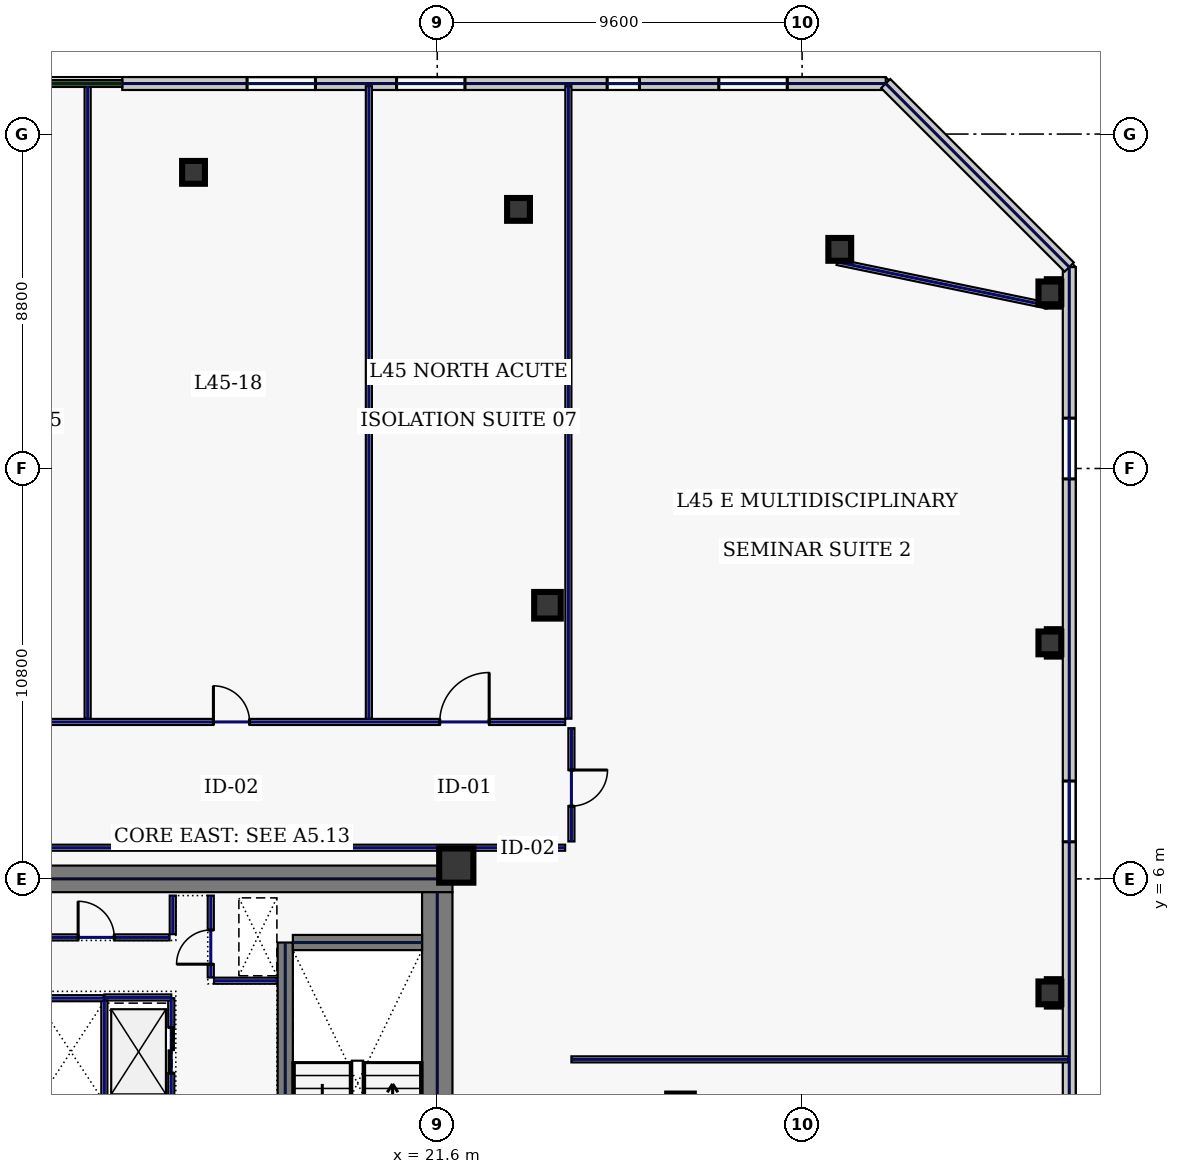
"""IFC4 building model, lengths in metres.
Left out: names, types, materials, properties, quantities, classifications, styles, units other than length and angle.
Written with IfcOpenShell. Run it as: python <this file> out.ifc"""

import sys

from ifc_helpers import new_model, si_unit, direction, frame, frame_2d, origin, origin_2d, place, context, subcontext, project, spatial, rectangle, hollow_rectangle, extrude, element, fill, save


model = new_model("IFC4")
c1 = context("Model", 3, precision=1e-05, world=origin(), true_north=direction((0.0, 1.0)))
c2 = subcontext(c1, "Body", "Model", "MODEL_VIEW")
j1 = project(units=[si_unit("LENGTHUNIT", "METRE"), si_unit("PLANEANGLEUNIT", "RADIAN")], contexts=[c1])
p1 = place(None, origin())
s1 = spatial("IfcSite", under=j1, at=p1, CompositionType="ELEMENT")
p2 = place(p1, origin())
s2 = spatial("IfcBuilding", under=s1, at=p2, CompositionType="ELEMENT")
p3 = place(p2, frame((0.0, 0.0, 196.2)))
s3 = spatial("IfcBuildingStorey", under=s2, at=p3, CompositionType="ELEMENT", Elevation=196.2)
p4 = place(p3, frame((10.45, 6.0, 0.0), z_axis=(0.0, 0.0, 1.0), x_axis=(1.0, 0.0, 0.0)))
e1 = element("IfcWall", 1, at=p4, inside=s3, PredefinedType="SHEAR", context=c2, shape_type="SweptSolid", body=[
    extrude(rectangle(XDim=11.55, YDim=0.7, at=frame_2d((5.775, 0.0))), origin(), (0.0, 0.0, 1.0), 3.74),
])
p5 = place(p3, frame((21.6, -5.65, 0.0), z_axis=(0.0, 0.0, 1.0), x_axis=(0.0, 1.0, 0.0)))
e2 = element("IfcWall", 2, at=p5, inside=s3, PredefinedType="SHEAR", context=c2, shape_type="SweptSolid", body=[
    extrude(rectangle(XDim=11.3, YDim=0.8, at=frame_2d((5.65, 0.0))), origin(), (0.0, 0.0, 1.0), 3.74),
])
p6 = place(p3, frame((17.6, -4.325, 0.0), z_axis=(0.0, 0.0, 1.0), x_axis=(0.0, 1.0, 0.0)))
e3 = element("IfcWall", 3, at=p6, inside=s3, PredefinedType="SHEAR", context=c2, shape_type="SweptSolid", body=[
    extrude(rectangle(XDim=8.65, YDim=0.4, at=frame_2d((4.325, 0.0))), origin(), (0.0, 0.0, 1.0), 3.74),
])
p7 = place(p6, frame((0.25, 0.0, 0.0)))
e4 = element("IfcOpeningElement", 4, at=p7, cuts=e3, PredefinedType="OPENING", context=c2, shape_type="SweptSolid", body=[
    extrude(rectangle(XDim=1.1, YDim=2.2, at=frame_2d((0.55, 1.1))), frame((0.0, 0.21, 0.0), z_axis=(0.0, -1.0, 0.0), x_axis=(1.0, 0.0, 0.0)), (0.0, 0.0, 1.0), 0.42),
])
p8 = place(p3, frame((17.8, 4.325, 0.0), z_axis=(0.0, 0.0, 1.0), x_axis=(1.0, 0.0, 0.0)))
e5 = element("IfcWall", 5, at=p8, inside=s3, PredefinedType="SHEAR", context=c2, shape_type="SweptSolid", body=[
    extrude(rectangle(XDim=3.4, YDim=0.4, at=frame_2d((1.7, 0.0))), origin(), (0.0, 0.0, 1.0), 3.74),
])
p9 = place(p3, frame((22.1, 6.35, 0.0), z_axis=(0.0, 0.0, 1.0), x_axis=(1.0, 0.0, 0.0)))
e6 = element("IfcColumn", 6, at=p9, inside=s3, PredefinedType="COLUMN", context=c2, shape_type="SweptSolid", body=[
    extrude(hollow_rectangle(XDim=0.9, YDim=0.9, WallThickness=0.04, at=origin_2d()), origin(), (0.0, 0.0, 1.0), 3.74),
])
for number, where, z_axis, x_axis in (
    (7, (24.5, 13.2, 0.0), (0.0, 0.0, 1.0), (1.0, 0.0, 0.0)),
    (8, (28.0, 0.0, 0.0), (0.0, 0.0, 1.0), (1.0, 0.0, 0.0)),
):
    element("IfcColumn", number, at=place(p3, frame(where, z_axis=z_axis, x_axis=x_axis)), inside=s3, PredefinedType="COLUMN", context=c2, shape_type="SweptSolid", body=[
        extrude(hollow_rectangle(XDim=0.7, YDim=0.7, WallThickness=0.032, at=origin_2d()), origin(), (0.0, 0.0, 1.0), 3.74),
    ])
for number, where, z_axis, x_axis in (
    (9, (32.191, 22.566, 0.0), (0.0, 0.0, 1.0), (1.0, 0.0, 0.0)),
    (10, (23.738, 23.618, 0.0), (0.0, 0.0, 1.0), (1.0, 0.0, 0.0)),
    (11, (15.186, 24.592, 0.0), (0.0, 0.0, 1.0), (1.0, 0.0, 0.0)),
    (12, (37.72, 3.0, 0.0), (0.0, 0.0, 1.0), (1.0, 0.0, 0.0)),
    (13, (37.72, 12.21, 0.0), (0.0, 0.0, 1.0), (1.0, 0.0, 0.0)),
    (14, (37.72, 21.42, 0.0), (0.0, 0.0, 1.0), (1.0, 0.0, 0.0)),
):
    element("IfcColumn", number, at=place(p3, frame(where, z_axis=z_axis, x_axis=x_axis)), inside=s3, PredefinedType="COLUMN", context=c2, shape_type="SweptSolid", body=[
        extrude(hollow_rectangle(XDim=0.6, YDim=0.6, WallThickness=0.028, at=origin_2d()), origin(), (0.0, 0.0, 1.0), 3.74),
    ])
p10 = place(p3, frame((33.4, 26.93, 0.0), z_axis=(0.0, 0.0, 1.0), x_axis=(-1.0, 0.0, 0.0)))
e15 = element("IfcWall", 15, at=p10, inside=s3, PredefinedType="STANDARD", context=c2, shape_type="SweptSolid", body=[
    extrude(rectangle(XDim=20.09, YDim=0.34, at=frame_2d((10.045, 0.0))), origin(), (0.0, 0.0, 1.0), 3.74),
])
p11 = place(p10, frame((15.005, 0.0, 0.7)))
e16 = element("IfcOpeningElement", 16, at=p11, cuts=e15, PredefinedType="OPENING", context=c2, shape_type="SweptSolid", body=[
    extrude(rectangle(XDim=1.8, YDim=2.2, at=frame_2d((0.9, 1.1))), frame((0.0, 0.18, 0.0), z_axis=(0.0, -1.0, 0.0), x_axis=(1.0, 0.0, 0.0)), (0.0, 0.0, 1.0), 0.36),
])
p12 = place(p10, frame((11.071, 0.0, 0.7)))
e17 = element("IfcOpeningElement", 17, at=p12, cuts=e15, PredefinedType="OPENING", context=c2, shape_type="SweptSolid", body=[
    extrude(rectangle(XDim=1.8, YDim=2.2, at=frame_2d((0.9, 1.1))), frame((0.0, 0.18, 0.0), z_axis=(0.0, -1.0, 0.0), x_axis=(1.0, 0.0, 0.0)), (0.0, 0.0, 1.0), 0.36),
])
p13 = place(p10, frame((6.48, 0.0, 0.7)))
e18 = element("IfcOpeningElement", 18, at=p13, cuts=e15, PredefinedType="OPENING", context=c2, shape_type="SweptSolid", body=[
    extrude(rectangle(XDim=0.85, YDim=1.85, at=frame_2d((0.425, 0.925))), frame((0.0, 0.18, 0.0), z_axis=(0.0, -1.0, 0.0), x_axis=(1.0, 0.0, 0.0)), (0.0, 0.0, 1.0), 0.36),
])
p14 = place(p10, frame((2.591, 0.0, 0.7)))
e19 = element("IfcOpeningElement", 19, at=p14, cuts=e15, PredefinedType="OPENING", context=c2, shape_type="SweptSolid", body=[
    extrude(rectangle(XDim=1.8, YDim=2.2, at=frame_2d((0.9, 1.1))), frame((0.0, 0.18, 0.0), z_axis=(0.0, -1.0, 0.0), x_axis=(1.0, 0.0, 0.0)), (0.0, 0.0, 1.0), 0.36),
])
p15 = place(p3, frame((38.23, -16.1, 0.0), z_axis=(0.0, 0.0, 1.0), x_axis=(0.0, 1.0, 0.0)))
e20 = element("IfcWall", 20, at=p15, inside=s3, PredefinedType="STANDARD", context=c2, shape_type="SweptSolid", body=[
    extrude(rectangle(XDim=38.2, YDim=0.34, at=frame_2d((19.1, 0.0))), origin(), (0.0, 0.0, 1.0), 3.74),
])
p16 = place(p15, frame((3.975, 0.0, 0.58)))
e21 = element("IfcOpeningElement", 21, at=p16, cuts=e20, PredefinedType="OPENING", context=c2, shape_type="SweptSolid", body=[
    extrude(rectangle(XDim=1.6, YDim=2.3, at=frame_2d((0.8, 1.15))), frame((0.0, 0.18, 0.0), z_axis=(0.0, -1.0, 0.0), x_axis=(1.0, 0.0, 0.0)), (0.0, 0.0, 1.0), 0.36),
])
p17 = place(p15, frame((13.525, 0.0, 0.58)))
e22 = element("IfcOpeningElement", 22, at=p17, cuts=e20, PredefinedType="OPENING", context=c2, shape_type="SweptSolid", body=[
    extrude(rectangle(XDim=1.6, YDim=2.3, at=frame_2d((0.8, 1.15))), frame((0.0, 0.18, 0.0), z_axis=(0.0, -1.0, 0.0), x_axis=(1.0, 0.0, 0.0)), (0.0, 0.0, 1.0), 0.36),
])
p18 = place(p15, frame((23.075, 0.0, 0.58)))
e23 = element("IfcOpeningElement", 23, at=p18, cuts=e20, PredefinedType="OPENING", context=c2, shape_type="SweptSolid", body=[
    extrude(rectangle(XDim=1.6, YDim=2.3, at=frame_2d((0.8, 1.15))), frame((0.0, 0.18, 0.0), z_axis=(0.0, -1.0, 0.0), x_axis=(1.0, 0.0, 0.0)), (0.0, 0.0, 1.0), 0.36),
])
p19 = place(p15, frame((32.625, 0.0, 0.58)))
e24 = element("IfcOpeningElement", 24, at=p19, cuts=e20, PredefinedType="OPENING", context=c2, shape_type="SweptSolid", body=[
    extrude(rectangle(XDim=1.6, YDim=2.3, at=frame_2d((0.8, 1.15))), frame((0.0, 0.18, 0.0), z_axis=(0.0, -1.0, 0.0), x_axis=(1.0, 0.0, 0.0)), (0.0, 0.0, 1.0), 0.36),
])
p20 = place(p3, frame((38.23, 22.1, 0.0), z_axis=(0.0, 0.0, 1.0), x_axis=(-0.707124652085, 0.707088909836, 0.0)))
e25 = element("IfcWall", 25, at=p20, inside=s3, PredefinedType="STANDARD", context=c2, shape_type="SweptSolid", body=[
    extrude(rectangle(XDim=6.831, YDim=0.34, at=frame_2d((3.415, 0.0))), origin(), (0.0, 0.0, 1.0), 3.74),
])
p21 = place(p3, frame((14.6, 0.12, 0.0), z_axis=(0.0, 0.0, 1.0), x_axis=(0.0, 1.0, 0.0)))
e26 = element("IfcWall", 26, at=p21, inside=s3, PredefinedType="PARTITIONING", context=c2, shape_type="SweptSolid", body=[
    extrude(rectangle(XDim=2.74, YDim=0.16, at=frame_2d((1.37, 0.0))), origin(), (0.0, 0.0, 1.0), 3.74),
])
p22 = place(p21, frame((0.77, 0.0, 0.0)))
e27 = element("IfcOpeningElement", 27, at=p22, cuts=e26, PredefinedType="OPENING", context=c2, shape_type="SweptSolid", body=[
    extrude(rectangle(XDim=1.2, YDim=2.2, at=frame_2d((0.6, 1.1))), frame((0.0, 0.09, 0.0), z_axis=(0.0, -1.0, 0.0), x_axis=(1.0, 0.0, 0.0)), (0.0, 0.0, 1.0), 0.18),
])
p23 = place(p3, frame((12.84, 2.88, 0.0), z_axis=(0.0, 0.0, 1.0), x_axis=(1.0, 0.0, 0.0)))
e28 = element("IfcWall", 28, at=p23, inside=s3, PredefinedType="PARTITIONING", context=c2, shape_type="SweptSolid", body=[
    extrude(rectangle(XDim=1.76, YDim=0.16, at=frame_2d((0.88, 0.0))), origin(), (0.0, 0.0, 1.0), 3.74),
])
p24 = place(p3, frame((12.84, 0.18, 0.0), z_axis=(0.0, 0.0, 1.0), x_axis=(0.0, 1.0, 0.0)))
e29 = element("IfcWall", 29, at=p24, inside=s3, PredefinedType="PARTITIONING", context=c2, shape_type="SweptSolid", body=[
    extrude(rectangle(XDim=2.62, YDim=0.16, at=frame_2d((1.31, 0.0))), origin(), (0.0, 0.0, 1.0), 3.74),
])
p25 = place(p3, frame((11.1, 2.86, 0.0), z_axis=(0.0, 0.0, 1.0), x_axis=(1.0, 0.0, 0.0)))
e30 = element("IfcWall", 30, at=p25, inside=s3, PredefinedType="PARTITIONING", context=c2, shape_type="SweptSolid", body=[
    extrude(rectangle(XDim=1.72, YDim=0.16, at=frame_2d((0.86, 0.0))), origin(), (0.0, 0.0, 1.0), 3.74),
])
p26 = place(p3, frame((15.64, 3.405, 0.0), z_axis=(0.0, 0.0, 1.0), x_axis=(0.0, 1.0, 0.0)))
e31 = element("IfcWall", 31, at=p26, inside=s3, PredefinedType="PARTITIONING", context=c2, shape_type="SweptSolid", body=[
    extrude(rectangle(XDim=2.155, YDim=0.16, at=frame_2d((1.078, 0.0))), origin(), (0.0, 0.0, 1.0), 3.74),
])
p27 = place(p26, frame((0.35, 0.0, 0.0)))
e32 = element("IfcOpeningElement", 32, at=p27, cuts=e31, PredefinedType="OPENING", context=c2, shape_type="SweptSolid", body=[
    extrude(rectangle(XDim=0.9, YDim=2.2, at=frame_2d((0.45, 1.1))), frame((0.0, 0.09, 0.0), z_axis=(0.0, -1.0, 0.0), x_axis=(1.0, 0.0, 0.0)), (0.0, 0.0, 1.0), 0.18),
])
p28 = place(p3, frame((15.725, 3.32, 0.0), z_axis=(0.0, 0.0, 1.0), x_axis=(1.0, 0.0, 0.0)))
e33 = element("IfcWall", 33, at=p28, inside=s3, PredefinedType="PARTITIONING", context=c2, shape_type="SweptSolid", body=[
    extrude(rectangle(XDim=1.655, YDim=0.16, at=frame_2d((0.827, 0.0))), origin(), (0.0, 0.0, 1.0), 3.74),
])
p29 = place(p3, frame((10.8, 4.46, 0.0), z_axis=(0.0, 0.0, 1.0), x_axis=(1.0, 0.0, 0.0)))
e34 = element("IfcWall", 34, at=p29, inside=s3, PredefinedType="PARTITIONING", context=c2, shape_type="SweptSolid", body=[
    extrude(rectangle(XDim=3.755, YDim=0.16, at=frame_2d((1.877, 0.0))), origin(), (0.0, 0.0, 1.0), 3.74),
])
p30 = place(p29, frame((1.35, 0.0, 0.0)))
e35 = element("IfcOpeningElement", 35, at=p30, cuts=e34, PredefinedType="OPENING", context=c2, shape_type="SweptSolid", body=[
    extrude(rectangle(XDim=0.95, YDim=2.2, at=frame_2d((0.475, 1.1))), frame((0.0, 0.09, 0.0), z_axis=(0.0, -1.0, 0.0), x_axis=(1.0, 0.0, 0.0)), (0.0, 0.0, 1.0), 0.18),
])
p31 = place(p3, frame((14.64, 4.545, 0.0), z_axis=(0.0, 0.0, 1.0), x_axis=(0.0, 1.0, 0.0)))
e36 = element("IfcWall", 36, at=p31, inside=s3, PredefinedType="PARTITIONING", context=c2, shape_type="SweptSolid", body=[
    extrude(rectangle(XDim=1.015, YDim=0.16, at=frame_2d((0.508, 0.0))), origin(), (0.0, 0.0, 1.0), 3.74),
])
p32 = place(p3, frame((37.651, 21.087, 0.0), z_axis=(0.0, 0.0, 1.0), x_axis=(-0.979184618318, 0.202971631636, 0.0)))
e37 = element("IfcWall", 37, at=p32, inside=s3, PredefinedType="PARTITIONING", context=c2, shape_type="SweptSolid", body=[
    extrude(rectangle(XDim=5.646, YDim=0.16, at=frame_2d((2.823, 0.0))), origin(), (0.0, 0.0, 1.0), 3.74),
])
p33 = place(p3, frame((-24.965, 10.13, 0.0), z_axis=(0.0, 0.0, 1.0), x_axis=(1.0, 0.0, 0.0)))
e38 = element("IfcWall", 38, at=p33, inside=s3, PredefinedType="PARTITIONING", context=c2, shape_type="SweptSolid", body=[
    extrude(rectangle(XDim=49.93, YDim=0.16, at=frame_2d((24.965, 0.0))), origin(), (0.0, 0.0, 1.0), 3.74),
])
p34 = place(p33, frame((2.044, 0.0, 0.0)))
e39 = element("IfcOpeningElement", 39, at=p34, cuts=e38, PredefinedType="OPENING", context=c2, shape_type="SweptSolid", body=[
    extrude(rectangle(XDim=0.95, YDim=2.2, at=frame_2d((0.475, 1.1))), frame((0.0, 0.09, 0.0), z_axis=(0.0, -1.0, 0.0), x_axis=(1.0, 0.0, 0.0)), (0.0, 0.0, 1.0), 0.18),
])
p35 = place(p33, frame((7.775, 0.0, 0.0)))
e40 = element("IfcOpeningElement", 40, at=p35, cuts=e38, PredefinedType="OPENING", context=c2, shape_type="SweptSolid", body=[
    extrude(rectangle(XDim=0.95, YDim=2.2, at=frame_2d((0.475, 1.1))), frame((0.0, 0.09, 0.0), z_axis=(0.0, -1.0, 0.0), x_axis=(1.0, 0.0, 0.0)), (0.0, 0.0, 1.0), 0.18),
])
p36 = place(p33, frame((15.275, 0.0, 0.0)))
e41 = element("IfcOpeningElement", 41, at=p36, cuts=e38, PredefinedType="OPENING", context=c2, shape_type="SweptSolid", body=[
    extrude(rectangle(XDim=0.95, YDim=2.2, at=frame_2d((0.475, 1.1))), frame((0.0, 0.09, 0.0), z_axis=(0.0, -1.0, 0.0), x_axis=(1.0, 0.0, 0.0)), (0.0, 0.0, 1.0), 0.18),
])
p37 = place(p33, frame((21.475, 0.0, 0.0)))
e42 = element("IfcOpeningElement", 42, at=p37, cuts=e38, PredefinedType="OPENING", context=c2, shape_type="SweptSolid", body=[
    extrude(rectangle(XDim=1.3, YDim=2.2, at=frame_2d((0.65, 1.1))), frame((0.0, 0.09, 0.0), z_axis=(0.0, -1.0, 0.0), x_axis=(1.0, 0.0, 0.0)), (0.0, 0.0, 1.0), 0.18),
])
p38 = place(p33, frame((26.15, 0.0, 0.0)))
e43 = element("IfcOpeningElement", 43, at=p38, cuts=e38, PredefinedType="OPENING", context=c2, shape_type="SweptSolid", body=[
    extrude(rectangle(XDim=0.95, YDim=2.2, at=frame_2d((0.475, 1.1))), frame((0.0, 0.09, 0.0), z_axis=(0.0, -1.0, 0.0), x_axis=(1.0, 0.0, 0.0)), (0.0, 0.0, 1.0), 0.18),
])
p39 = place(p33, frame((32.575, 0.0, 0.0)))
e44 = element("IfcOpeningElement", 44, at=p39, cuts=e38, PredefinedType="OPENING", context=c2, shape_type="SweptSolid", body=[
    extrude(rectangle(XDim=0.95, YDim=2.2, at=frame_2d((0.475, 1.1))), frame((0.0, 0.09, 0.0), z_axis=(0.0, -1.0, 0.0), x_axis=(1.0, 0.0, 0.0)), (0.0, 0.0, 1.0), 0.18),
])
p40 = place(p33, frame((40.675, 0.0, 0.0)))
e45 = element("IfcOpeningElement", 45, at=p40, cuts=e38, PredefinedType="OPENING", context=c2, shape_type="SweptSolid", body=[
    extrude(rectangle(XDim=0.95, YDim=2.2, at=frame_2d((0.475, 1.1))), frame((0.0, 0.09, 0.0), z_axis=(0.0, -1.0, 0.0), x_axis=(1.0, 0.0, 0.0)), (0.0, 0.0, 1.0), 0.18),
])
p41 = place(p33, frame((46.631, 0.0, 0.0)))
e46 = element("IfcOpeningElement", 46, at=p41, cuts=e38, PredefinedType="OPENING", context=c2, shape_type="SweptSolid", body=[
    extrude(rectangle(XDim=1.3, YDim=2.2, at=frame_2d((0.65, 1.1))), frame((0.0, 0.09, 0.0), z_axis=(0.0, -1.0, 0.0), x_axis=(1.0, 0.0, 0.0)), (0.0, 0.0, 1.0), 0.18),
])
p42 = place(p3, frame((25.13, 9.965, 0.0), z_axis=(0.0, 0.0, 1.0), x_axis=(0.0, -1.0, 0.0)))
e47 = element("IfcWall", 47, at=p42, inside=s3, PredefinedType="PARTITIONING", context=c2, shape_type="SweptSolid", body=[
    extrude(rectangle(XDim=2.98, YDim=0.16, at=frame_2d((1.49, 0.0))), origin(), (0.0, 0.0, 1.0), 3.74),
])
p43 = place(p42, frame((1.1, 0.0, 0.0)))
e48 = element("IfcOpeningElement", 48, at=p43, cuts=e47, PredefinedType="OPENING", context=c2, shape_type="SweptSolid", body=[
    extrude(rectangle(XDim=0.95, YDim=2.2, at=frame_2d((0.475, 1.1))), frame((0.0, 0.09, 0.0), z_axis=(0.0, -1.0, 0.0), x_axis=(1.0, 0.0, 0.0)), (0.0, 0.0, 1.0), 0.18),
])
p44 = place(p3, frame((24.965, 6.82, 0.0), z_axis=(0.0, 0.0, 1.0), x_axis=(-1.0, 0.0, 0.0)))
e49 = element("IfcWall", 49, at=p44, inside=s3, PredefinedType="PARTITIONING", context=c2, shape_type="SweptSolid", body=[
    extrude(rectangle(XDim=14.335, YDim=0.16, at=frame_2d((7.167, 0.0))), origin(), (0.0, 0.0, 1.0), 3.74),
])
for number, where, z_axis, x_axis in (
    (50, (25.05, 10.215, 0.0), (0.0, 0.0, 1.0), (0.0, 1.0, 0.0)),
    (51, (12.4, 10.215, 0.0), (0.0, 0.0, 1.0), (0.0, 1.0, 0.0)),
    (52, (19.8, 10.215, 0.0), (0.0, 0.0, 1.0), (0.0, 1.0, 0.0)),
):
    element("IfcWall", number, at=place(p3, frame(where, z_axis=z_axis, x_axis=x_axis)), inside=s3, PredefinedType="PARTITIONING", context=c2, shape_type="SweptSolid", body=[
        extrude(rectangle(XDim=16.645, YDim=0.16, at=frame_2d((8.323, 0.0))), origin(), (0.0, 0.0, 1.0), 3.74),
    ])
p45 = place(p3, frame((25.13, 1.25, 0.0), z_axis=(0.0, 0.0, 1.0), x_axis=(1.0, 0.0, 0.0)))
e53 = element("IfcWall", 53, at=p45, inside=s3, PredefinedType="PARTITIONING", context=c2, shape_type="SweptSolid", body=[
    extrude(rectangle(XDim=13.08, YDim=0.16, at=frame_2d((6.54, 0.0))), origin(), (0.0, 0.0, 1.0), 3.285),
])
p46 = place(p11, origin())
e54 = element("IfcWindow", 54, at=p46, inside=s3, PartitioningType="SINGLE_PANEL", PredefinedType="WINDOW", context=c2, shape_type="SweptSolid", body=[
    extrude(rectangle(XDim=1.8, YDim=2.2, at=frame_2d((0.9, 1.1))), frame((0.0, 0.03, 0.0), z_axis=(0.0, -1.0, 0.0), x_axis=(1.0, 0.0, 0.0)), (0.0, 0.0, 1.0), 0.06),
])
fill(e16, e54)
p47 = place(p12, origin())
e55 = element("IfcWindow", 55, at=p47, inside=s3, PartitioningType="SINGLE_PANEL", PredefinedType="WINDOW", context=c2, shape_type="SweptSolid", body=[
    extrude(rectangle(XDim=1.8, YDim=2.2, at=frame_2d((0.9, 1.1))), frame((0.0, 0.03, 0.0), z_axis=(0.0, -1.0, 0.0), x_axis=(1.0, 0.0, 0.0)), (0.0, 0.0, 1.0), 0.06),
])
fill(e17, e55)
p48 = place(p13, origin())
e56 = element("IfcWindow", 56, at=p48, inside=s3, PartitioningType="SINGLE_PANEL", PredefinedType="WINDOW", context=c2, shape_type="SweptSolid", body=[
    extrude(rectangle(XDim=0.85, YDim=1.85, at=frame_2d((0.425, 0.925))), frame((0.0, 0.03, 0.0), z_axis=(0.0, -1.0, 0.0), x_axis=(1.0, 0.0, 0.0)), (0.0, 0.0, 1.0), 0.06),
])
fill(e18, e56)
p49 = place(p14, origin())
e57 = element("IfcWindow", 57, at=p49, inside=s3, PartitioningType="SINGLE_PANEL", PredefinedType="WINDOW", context=c2, shape_type="SweptSolid", body=[
    extrude(rectangle(XDim=1.8, YDim=2.2, at=frame_2d((0.9, 1.1))), frame((0.0, 0.03, 0.0), z_axis=(0.0, -1.0, 0.0), x_axis=(1.0, 0.0, 0.0)), (0.0, 0.0, 1.0), 0.06),
])
fill(e19, e57)
p50 = place(p18, origin())
e58 = element("IfcWindow", 58, at=p50, inside=s3, PartitioningType="SINGLE_PANEL", PredefinedType="WINDOW", context=c2, shape_type="SweptSolid", body=[
    extrude(rectangle(XDim=1.6, YDim=2.3, at=frame_2d((0.8, 1.15))), frame((0.0, 0.03, 0.0), z_axis=(0.0, -1.0, 0.0), x_axis=(1.0, 0.0, 0.0)), (0.0, 0.0, 1.0), 0.06),
])
fill(e23, e58)
p51 = place(p19, origin())
e59 = element("IfcWindow", 59, at=p51, inside=s3, PartitioningType="SINGLE_PANEL", PredefinedType="WINDOW", context=c2, shape_type="SweptSolid", body=[
    extrude(rectangle(XDim=1.6, YDim=2.3, at=frame_2d((0.8, 1.15))), frame((0.0, 0.03, 0.0), z_axis=(0.0, -1.0, 0.0), x_axis=(1.0, 0.0, 0.0)), (0.0, 0.0, 1.0), 0.06),
])
fill(e24, e59)
p52 = place(p22, origin())
e60 = element("IfcDoor", 60, at=p52, inside=s3, OperationType="SLIDING_TO_LEFT", PredefinedType="DOOR", context=c2, shape_type="SweptSolid", body=[
    extrude(rectangle(XDim=1.2, YDim=2.2, at=frame_2d((0.6, 1.1))), frame((0.0, 0.025, 0.0), z_axis=(0.0, -1.0, 0.0), x_axis=(1.0, 0.0, 0.0)), (0.0, 0.0, 1.0), 0.05),
])
fill(e27, e60)
p53 = place(p27, origin())
e61 = element("IfcDoor", 61, at=p53, inside=s3, OperationType="SINGLE_SWING_LEFT", PredefinedType="DOOR", context=c2, shape_type="SweptSolid", body=[
    extrude(rectangle(XDim=0.9, YDim=2.2, at=frame_2d((0.45, 1.1))), frame((0.0, 0.025, 0.0), z_axis=(0.0, -1.0, 0.0), x_axis=(1.0, 0.0, 0.0)), (0.0, 0.0, 1.0), 0.05),
])
fill(e32, e61)
p54 = place(p30, origin())
e62 = element("IfcDoor", 62, at=p54, inside=s3, OperationType="SINGLE_SWING_LEFT", PredefinedType="DOOR", context=c2, shape_type="SweptSolid", body=[
    extrude(rectangle(XDim=0.95, YDim=2.2, at=frame_2d((0.475, 1.1))), frame((0.0, 0.025, 0.0), z_axis=(0.0, -1.0, 0.0), x_axis=(1.0, 0.0, 0.0)), (0.0, 0.0, 1.0), 0.05),
])
fill(e35, e62)
p55 = place(p40, origin())
e63 = element("IfcDoor", 63, at=p55, inside=s3, OperationType="SINGLE_SWING_LEFT", PredefinedType="DOOR", context=c2, shape_type="SweptSolid", body=[
    extrude(rectangle(XDim=0.95, YDim=2.2, at=frame_2d((0.475, 1.1))), frame((0.0, 0.025, 0.0), z_axis=(0.0, -1.0, 0.0), x_axis=(1.0, 0.0, 0.0)), (0.0, 0.0, 1.0), 0.05),
])
fill(e45, e63)
p56 = place(p41, origin())
e64 = element("IfcDoor", 64, at=p56, inside=s3, OperationType="SINGLE_SWING_RIGHT", PredefinedType="DOOR", context=c2, shape_type="SweptSolid", body=[
    extrude(rectangle(XDim=1.3, YDim=2.2, at=frame_2d((0.65, 1.1))), frame((0.0, 0.025, 0.0), z_axis=(0.0, -1.0, 0.0), x_axis=(1.0, 0.0, 0.0)), (0.0, 0.0, 1.0), 0.05),
])
fill(e46, e64)
p57 = place(p43, origin())
e65 = element("IfcDoor", 65, at=p57, inside=s3, OperationType="SINGLE_SWING_LEFT", PredefinedType="DOOR", context=c2, shape_type="SweptSolid", body=[
    extrude(rectangle(XDim=0.95, YDim=2.2, at=frame_2d((0.475, 1.1))), frame((0.0, 0.025, 0.0), z_axis=(0.0, -1.0, 0.0), x_axis=(1.0, 0.0, 0.0)), (0.0, 0.0, 1.0), 0.05),
])
fill(e48, e65)
save(model, sys.argv[1])
